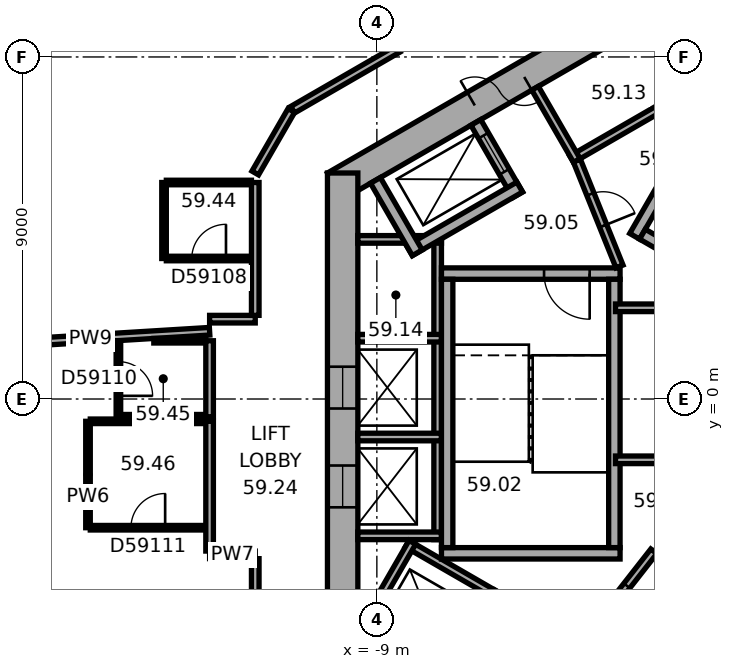
"""IFC4 building model, lengths in metres.
Left out: names, types, materials, properties, quantities, classifications, styles, units other than length and angle.
Written with IfcOpenShell. Run it as: python <this file> out.ifc"""

import sys

from ifc_helpers import new_model, si_unit, direction, frame, frame_2d, origin, place, context, subcontext, project, spatial, rectangle, extrude, element, fill, save


model = new_model("IFC4")
c1 = context("Model", 3, precision=1e-05, world=origin(), true_north=direction((0.0, 1.0)))
c2 = subcontext(c1, "Body", "Model", "MODEL_VIEW")
j1 = project(units=[si_unit("LENGTHUNIT", "METRE"), si_unit("PLANEANGLEUNIT", "RADIAN")], contexts=[c1])
p1 = place(None, origin())
s1 = spatial("IfcSite", under=j1, at=p1, CompositionType="ELEMENT")
p2 = place(p1, origin())
s2 = spatial("IfcBuilding", under=s1, at=p2, CompositionType="ELEMENT")
p3 = place(p2, frame((0.0, 0.0, 240.2)))
s3 = spatial("IfcBuildingStorey", under=s2, at=p3, CompositionType="ELEMENT", Elevation=240.2)
p4 = place(p3, frame((0.2, 11.547, 0.0), z_axis=(0.0, 0.0, 1.0), x_axis=(-0.866023897231, -0.500002609418, 0.0)))
e1 = element("IfcWall", 1, at=p4, inside=s3, PredefinedType="SHEAR", context=c2, shape_type="SweptSolid", body=[
    extrude(rectangle(XDim=11.894, YDim=0.8, at=frame_2d((5.947, 0.0))), origin(), (0.0, 0.0, 1.0), 3.7),
])
p5 = place(p4, frame((6.147, 0.0, 0.0)))
e2 = element("IfcOpeningElement", 2, at=p5, cuts=e1, PredefinedType="OPENING", context=c2, shape_type="SweptSolid", body=[
    extrude(rectangle(XDim=1.5, YDim=2.1, at=frame_2d((0.75, 1.05))), frame((0.0, 0.41, 0.0), z_axis=(0.0, -1.0, 0.0), x_axis=(1.0, 0.0, 0.0)), (0.0, 0.0, 1.0), 0.82),
])
p6 = place(p4, frame((2.997, 0.0, 0.0)))
e3 = element("IfcOpeningElement", 3, at=p6, cuts=e1, PredefinedType="OPENING", context=c2, shape_type="SweptSolid", body=[
    extrude(rectangle(XDim=0.9, YDim=2.1, at=frame_2d((0.45, 1.05))), frame((0.0, 0.41, 0.0), z_axis=(0.0, -1.0, 0.0), x_axis=(1.0, 0.0, 0.0)), (0.0, 0.0, 1.0), 0.82),
])
p7 = place(p3, frame((-9.9, 5.947, 0.0), z_axis=(0.0, 0.0, 1.0), x_axis=(0.0, -1.0, 0.0)))
e4 = element("IfcWall", 4, at=p7, inside=s3, PredefinedType="SHEAR", context=c2, shape_type="SweptSolid", body=[
    extrude(rectangle(XDim=11.894, YDim=0.8, at=frame_2d((5.947, 0.0))), origin(), (0.0, 0.0, 1.0), 3.7),
])
p8 = place(p7, frame((5.097, 0.0, 0.0)))
e5 = element("IfcOpeningElement", 5, at=p8, cuts=e4, PredefinedType="OPENING", context=c2, shape_type="SweptSolid", body=[
    extrude(rectangle(XDim=1.1, YDim=2.1, at=frame_2d((0.55, 1.05))), frame((0.0, 0.41, 0.0), z_axis=(0.0, -1.0, 0.0), x_axis=(1.0, 0.0, 0.0)), (0.0, 0.0, 1.0), 0.82),
])
p9 = place(p7, frame((7.697, 0.0, 0.0)))
e6 = element("IfcOpeningElement", 6, at=p9, cuts=e4, PredefinedType="OPENING", context=c2, shape_type="SweptSolid", body=[
    extrude(rectangle(XDim=1.1, YDim=2.1, at=frame_2d((0.55, 1.05))), frame((0.0, 0.41, 0.0), z_axis=(0.0, -1.0, 0.0), x_axis=(1.0, 0.0, 0.0)), (0.0, 0.0, 1.0), 0.82),
])
p10 = place(p3, frame((0.803, 9.009, 0.0), z_axis=(0.0, 0.0, 1.0), x_axis=(-0.866028230842, -0.499995103361, 0.0)))
e7 = element("IfcWall", 7, at=p10, inside=s3, PredefinedType="PARTITIONING", context=c2, shape_type="SweptSolid", body=[
    extrude(rectangle(XDim=5.4, YDim=0.2, at=frame_2d((2.7, 0.0))), origin(), (0.0, 0.0, 1.0), 3.42),
])
p11 = place(p3, frame((-3.737, 6.272, 0.0), z_axis=(0.0, 0.0, 1.0), x_axis=(-0.50002983664, 0.866008176907, 0.0)))
e8 = element("IfcWall", 8, at=p11, inside=s3, PredefinedType="PARTITIONING", context=c2, shape_type="SweptSolid", body=[
    extrude(rectangle(XDim=2.2, YDim=0.2, at=frame_2d((1.1, 0.0))), origin(), (0.0, 0.0, 1.0), 3.42),
])
p12 = place(p3, frame((-7.4, 4.3, 0.0), z_axis=(0.0, 0.0, 1.0), x_axis=(0.0, -1.0, 0.0)))
e9 = element("IfcWall", 9, at=p12, inside=s3, PredefinedType="PARTITIONING", context=c2, shape_type="SweptSolid", body=[
    extrude(rectangle(XDim=8.0, YDim=0.2, at=frame_2d((4.0, 0.0))), origin(), (0.0, 0.0, 1.0), 3.42),
])
for number, where, z_axis, x_axis in (
    (10, (-7.3, 4.2, 0.0), (0.0, 0.0, 1.0), (-1.0, 0.0, 0.0)),
    (11, (-7.3, 1.6, 0.0), (0.0, 0.0, 1.0), (-1.0, 0.0, 0.0)),
    (12, (-7.3, -1.0, 0.0), (0.0, 0.0, 1.0), (-1.0, 0.0, 0.0)),
    (13, (-7.3, -3.6, 0.0), (0.0, 0.0, 1.0), (-1.0, 0.0, 0.0)),
):
    element("IfcWall", number, at=place(p3, frame(where, z_axis=z_axis, x_axis=x_axis)), inside=s3, PredefinedType="PARTITIONING", context=c2, shape_type="SweptSolid", body=[
        extrude(rectangle(XDim=2.2, YDim=0.2, at=frame_2d((1.1, 0.0))), origin(), (0.0, 0.0, 1.0), 3.42),
    ])
p13 = place(p3, frame((-8.203, -3.809, 0.0), z_axis=(0.0, 0.0, 1.0), x_axis=(0.866028230842, -0.499995103361, 0.0)))
e14 = element("IfcWall", 14, at=p13, inside=s3, PredefinedType="PARTITIONING", context=c2, shape_type="SweptSolid", body=[
    extrude(rectangle(XDim=5.4, YDim=0.2, at=frame_2d((2.7, 0.0))), origin(), (0.0, 0.0, 1.0), 3.42),
])
p14 = place(p3, frame((-8.067, -3.772, 0.0), z_axis=(0.0, 0.0, 1.0), x_axis=(-0.50002983664, -0.866008176907, 0.0)))
e15 = element("IfcWall", 15, at=p14, inside=s3, PredefinedType="PARTITIONING", context=c2, shape_type="SweptSolid", body=[
    extrude(rectangle(XDim=2.2, YDim=0.2, at=frame_2d((1.1, 0.0))), origin(), (0.0, 0.0, 1.0), 3.42),
])
p15 = place(p3, frame((-2.216, 4.282, 0.0), z_axis=(0.0, 0.0, 1.0), x_axis=(0.499977259774, 0.866038532462, 0.0)))
e16 = element("IfcWall", 16, at=p15, inside=s3, PredefinedType="SHEAR", context=c2, shape_type="SweptSolid", body=[
    extrude(rectangle(XDim=4.7, YDim=0.3, at=frame_2d((2.35, 0.0))), origin(), (0.0, 0.0, 1.0), 3.42),
])
p16 = place(p3, frame((4.103, 0.807, 0.0), z_axis=(0.0, 0.0, 1.0), x_axis=(-0.866027801685, 0.499995846692, 0.0)))
e17 = element("IfcWall", 17, at=p16, inside=s3, PredefinedType="SHEAR", context=c2, shape_type="SweptSolid", body=[
    extrude(rectangle(XDim=7.06, YDim=0.3, at=frame_2d((3.53, 0.0))), origin(), (0.0, 0.0, 1.0), 3.42),
])
p17 = place(p3, frame((-2.6, 3.3, 0.0), z_axis=(0.0, 0.0, 1.0), x_axis=(-1.0, 0.0, 0.0)))
e18 = element("IfcWall", 18, at=p17, inside=s3, PredefinedType="SHEAR", context=c2, shape_type="SweptSolid", body=[
    extrude(rectangle(XDim=4.7, YDim=0.3, at=frame_2d((2.35, 0.0))), origin(), (0.0, 0.0, 1.0), 3.42),
])
p18 = place(p17, frame((0.8, 0.0, 0.0)))
e19 = element("IfcOpeningElement", 19, at=p18, cuts=e18, PredefinedType="OPENING", context=c2, shape_type="SweptSolid", body=[
    extrude(rectangle(XDim=1.2, YDim=2.1, at=frame_2d((0.6, 1.05))), frame((0.0, 0.16, 0.0), z_axis=(0.0, -1.0, 0.0), x_axis=(1.0, 0.0, 0.0)), (0.0, 0.0, 1.0), 0.32),
])
p19 = place(p3, frame((-2.6, -4.06, 0.0), z_axis=(0.0, 0.0, 1.0), x_axis=(-1.0, 0.0, 0.0)))
e20 = element("IfcWall", 20, at=p19, inside=s3, PredefinedType="SHEAR", context=c2, shape_type="SweptSolid", body=[
    extrude(rectangle(XDim=4.7, YDim=0.3, at=frame_2d((2.35, 0.0))), origin(), (0.0, 0.0, 1.0), 3.42),
])
for number, where, z_axis, x_axis in (
    (21, (-2.75, 3.15, 0.0), (0.0, 0.0, 1.0), (0.0, -1.0, 0.0)),
    (22, (-7.15, 3.15, 0.0), (0.0, 0.0, 1.0), (0.0, -1.0, 0.0)),
):
    element("IfcWall", number, at=place(p3, frame(where, z_axis=z_axis, x_axis=x_axis)), inside=s3, PredefinedType="SHEAR", context=c2, shape_type="SweptSolid", body=[
        extrude(rectangle(XDim=7.06, YDim=0.3, at=frame_2d((3.53, 0.0))), origin(), (0.0, 0.0, 1.0), 3.42),
    ])
p20 = place(p3, frame((-5.295, 5.372, 0.0), z_axis=(0.0, 0.0, 1.0), x_axis=(-0.500077893725, 0.86598042715, 0.0)))
e23 = element("IfcWall", 23, at=p20, inside=s3, PredefinedType="SHEAR", context=c2, shape_type="SweptSolid", body=[
    extrude(rectangle(XDim=2.2, YDim=0.3, at=frame_2d((1.1, 0.0))), origin(), (0.0, 0.0, 1.0), 3.42),
])
p21 = place(p20, frame((0.7, 0.0, 0.0)))
e24 = element("IfcOpeningElement", 24, at=p21, cuts=e23, PredefinedType="OPENING", context=c2, shape_type="SweptSolid", body=[
    extrude(rectangle(XDim=1.1, YDim=2.1, at=frame_2d((0.55, 1.05))), frame((0.0, 0.16, 0.0), z_axis=(0.0, -1.0, 0.0), x_axis=(1.0, 0.0, 0.0)), (0.0, 0.0, 1.0), 0.32),
])
p22 = place(p3, frame((-5.24, 5.577, 0.0), z_axis=(0.0, 0.0, 1.0), x_axis=(-0.866014461049, -0.500018952895, 0.0)))
e25 = element("IfcWall", 25, at=p22, inside=s3, PredefinedType="SHEAR", context=c2, shape_type="SweptSolid", body=[
    extrude(rectangle(XDim=3.35, YDim=0.3, at=frame_2d((1.675, 0.0))), origin(), (0.0, 0.0, 1.0), 3.42),
])
p23 = place(p3, frame((-7.937, 3.847, 0.0), z_axis=(0.0, 0.0, 1.0), x_axis=(-0.50002983664, 0.866008176907, 0.0)))
e26 = element("IfcWall", 26, at=p23, inside=s3, PredefinedType="SHEAR", context=c2, shape_type="SweptSolid", body=[
    extrude(rectangle(XDim=2.2, YDim=0.3, at=frame_2d((1.1, 0.0))), origin(), (0.0, 0.0, 1.0), 3.42),
])
p24 = place(p3, frame((-2.615, 3.487, 0.0), z_axis=(0.0, 0.0, 1.0), x_axis=(-0.373576831041, 0.92759924068, 0.0)))
e27 = element("IfcWall", 27, at=p24, inside=s3, PredefinedType="PARTITIONING", context=c2, shape_type="SweptSolid", body=[
    extrude(rectangle(XDim=3.002, YDim=0.2, at=frame_2d((1.501, 0.0))), origin(), (0.0, 0.0, 1.0), 3.42),
])
p25 = place(p24, frame((1.15, 0.0, 0.0)))
e28 = element("IfcOpeningElement", 28, at=p25, cuts=e27, PredefinedType="OPENING", context=c2, shape_type="SweptSolid", body=[
    extrude(rectangle(XDim=0.9, YDim=2.1, at=frame_2d((0.45, 1.05))), frame((0.0, 0.11, 0.0), z_axis=(0.0, -1.0, 0.0), x_axis=(1.0, 0.0, 0.0)), (0.0, 0.0, 1.0), 0.22),
])
p26 = place(p3, frame((-1.712, -4.008, 0.0), z_axis=(0.0, 0.0, 1.0), x_axis=(-0.616549420702, -0.787316208287, 0.0)))
e29 = element("IfcWall", 29, at=p26, inside=s3, PredefinedType="PARTITIONING", context=c2, shape_type="SweptSolid", body=[
    extrude(rectangle(XDim=3.002, YDim=0.2, at=frame_2d((1.501, 0.0))), origin(), (0.0, 0.0, 1.0), 3.42),
])
p27 = place(p26, frame((1.15, 0.0, 0.0)))
e30 = element("IfcOpeningElement", 30, at=p27, cuts=e29, PredefinedType="OPENING", context=c2, shape_type="SweptSolid", body=[
    extrude(rectangle(XDim=0.9, YDim=2.1, at=frame_2d((0.45, 1.05))), frame((0.0, 0.11, 0.0), z_axis=(0.0, -1.0, 0.0), x_axis=(1.0, 0.0, 0.0)), (0.0, 0.0, 1.0), 0.22),
])
p28 = place(p3, frame((-2.72, -1.6, 0.0), z_axis=(0.0, 0.0, 1.0), x_axis=(1.0, 0.0, 0.0)))
e31 = element("IfcWall", 31, at=p28, inside=s3, PredefinedType="PARTITIONING", context=c2, shape_type="SweptSolid", body=[
    extrude(rectangle(XDim=5.269, YDim=0.2, at=frame_2d((2.634, 0.0))), origin(), (0.0, 0.0, 1.0), 3.42),
])
p29 = place(p3, frame((-2.72, 2.4, 0.0), z_axis=(0.0, 0.0, 1.0), x_axis=(1.0, 0.0, 0.0)))
e32 = element("IfcWall", 32, at=p29, inside=s3, PredefinedType="PARTITIONING", context=c2, shape_type="SweptSolid", body=[
    extrude(rectangle(XDim=3.883, YDim=0.2, at=frame_2d((1.941, 0.0))), origin(), (0.0, 0.0, 1.0), 3.42),
])
p30 = place(p3, frame((-19.672, 1.4, 0.0), z_axis=(0.0, 0.0, 1.0), x_axis=(0.99813499784, 0.061045278997, 0.0)))
e33 = element("IfcWall", 33, at=p30, inside=s3, PredefinedType="PARTITIONING", context=c2, shape_type="SweptSolid", body=[
    extrude(rectangle(XDim=6.283, YDim=0.2, at=frame_2d((3.142, 0.0))), origin(), (0.0, 0.0, 1.0), 2.87),
])
p31 = place(p3, frame((-16.601, -3.387, 0.0), z_axis=(0.0, 0.0, 1.0), x_axis=(0.0, 1.0, 0.0)))
e34 = element("IfcWall", 34, at=p31, inside=s3, PredefinedType="PARTITIONING", context=c2, shape_type="SweptSolid", body=[
    extrude(rectangle(XDim=2.8, YDim=0.12, at=frame_2d((1.4, 0.0))), origin(), (0.0, 0.0, 1.0), 3.42),
])
p32 = place(p3, frame((-16.541, -0.587, 0.0), z_axis=(0.0, 0.0, 1.0), x_axis=(1.0, 0.0, 0.0)))
e35 = element("IfcWall", 35, at=p32, inside=s3, PredefinedType="PARTITIONING", context=c2, shape_type="SweptSolid", body=[
    extrude(rectangle(XDim=3.04, YDim=0.12, at=frame_2d((1.52, 0.0))), origin(), (0.0, 0.0, 1.0), 3.42),
])
p33 = place(p3, frame((-15.801, -0.467, 0.0), z_axis=(0.0, 0.0, 1.0), x_axis=(0.0, 1.0, 0.0)))
e36 = element("IfcWall", 36, at=p33, inside=s3, PredefinedType="PARTITIONING", context=c2, shape_type="SweptSolid", body=[
    extrude(rectangle(XDim=2.0, YDim=0.12, at=frame_2d((1.0, 0.0))), origin(), (0.0, 0.0, 1.0), 3.42),
])
p34 = place(p33, frame((0.55, 0.0, 0.0)))
e37 = element("IfcOpeningElement", 37, at=p34, cuts=e36, PredefinedType="OPENING", context=c2, shape_type="SweptSolid", body=[
    extrude(rectangle(XDim=0.9, YDim=2.1, at=frame_2d((0.45, 1.05))), frame((0.0, 0.07, 0.0), z_axis=(0.0, -1.0, 0.0), x_axis=(1.0, 0.0, 0.0)), (0.0, 0.0, 1.0), 0.14),
])
p35 = place(p3, frame((-14.869, 1.533, 0.0), z_axis=(0.0, 0.0, 1.0), x_axis=(1.0, 0.0, 0.0)))
e38 = element("IfcWall", 38, at=p35, inside=s3, PredefinedType="PARTITIONING", context=c2, shape_type="SweptSolid", body=[
    extrude(rectangle(XDim=1.368, YDim=0.12, at=frame_2d((0.684, 0.0))), origin(), (0.0, 0.0, 1.0), 3.42),
])
p36 = place(p3, frame((-14.6, 3.697, 0.0), z_axis=(0.0, 0.0, 1.0), x_axis=(0.0, 1.0, 0.0)))
e39 = element("IfcWall", 39, at=p36, inside=s3, PredefinedType="PARTITIONING", context=c2, shape_type="SweptSolid", body=[
    extrude(rectangle(XDim=2.0, YDim=0.12, at=frame_2d((1.0, 0.0))), origin(), (0.0, 0.0, 1.0), 3.42),
])
p37 = place(p3, frame((-14.54, 5.697, 0.0), z_axis=(0.0, 0.0, 1.0), x_axis=(1.0, 0.0, 0.0)))
e40 = element("IfcWall", 40, at=p37, inside=s3, PredefinedType="PARTITIONING", context=c2, shape_type="SweptSolid", body=[
    extrude(rectangle(XDim=2.24, YDim=0.12, at=frame_2d((1.12, 0.0))), origin(), (0.0, 0.0, 1.0), 3.42),
])
p38 = place(p3, frame((-13.501, -3.387, 0.0), z_axis=(0.0, 0.0, 1.0), x_axis=(-1.0, 0.0, 0.0)))
e41 = element("IfcWall", 41, at=p38, inside=s3, PredefinedType="PARTITIONING", context=c2, shape_type="SweptSolid", body=[
    extrude(rectangle(XDim=3.04, YDim=0.12, at=frame_2d((1.52, 0.0))), origin(), (0.0, 0.0, 1.0), 3.42),
])
p39 = place(p38, frame((1.07, 0.0, 0.0)))
e42 = element("IfcOpeningElement", 42, at=p39, cuts=e41, PredefinedType="OPENING", context=c2, shape_type="SweptSolid", body=[
    extrude(rectangle(XDim=0.9, YDim=2.1, at=frame_2d((0.45, 1.05))), frame((0.0, 0.07, 0.0), z_axis=(0.0, -1.0, 0.0), x_axis=(1.0, 0.0, 0.0)), (0.0, 0.0, 1.0), 0.14),
])
p40 = place(p3, frame((-13.501, -0.467, 0.0), z_axis=(0.0, 0.0, 1.0), x_axis=(-1.0, 0.0, 0.0)))
e43 = element("IfcWall", 43, at=p40, inside=s3, PredefinedType="PARTITIONING", context=c2, shape_type="SweptSolid", body=[
    extrude(rectangle(XDim=2.24, YDim=0.12, at=frame_2d((1.12, 0.0))), origin(), (0.0, 0.0, 1.0), 3.42),
])
p41 = place(p3, frame((-13.401, -4.101, 0.0), z_axis=(0.0, 0.0, 1.0), x_axis=(1.0, 0.0, 0.0)))
e44 = element("IfcWall", 44, at=p41, inside=s3, PredefinedType="PARTITIONING", context=c2, shape_type="SweptSolid", body=[
    extrude(rectangle(XDim=1.201, YDim=0.2, at=frame_2d((0.601, 0.0))), origin(), (0.0, 0.0, 1.0), 3.42),
])
p42 = place(p3, frame((-13.401, -0.587, 0.0), z_axis=(0.0, 0.0, 1.0), x_axis=(0.0, -1.0, 0.0)))
e45 = element("IfcWall", 45, at=p42, inside=s3, PredefinedType="PARTITIONING", context=c2, shape_type="SweptSolid", body=[
    extrude(rectangle(XDim=3.414, YDim=0.2, at=frame_2d((1.707, 0.0))), origin(), (0.0, 0.0, 1.0), 3.42),
])
p43 = place(p3, frame((-13.401, 1.533, 0.0), z_axis=(0.0, 0.0, 1.0), x_axis=(0.0, -1.0, 0.0)))
e46 = element("IfcWall", 46, at=p43, inside=s3, PredefinedType="PARTITIONING", context=c2, shape_type="SweptSolid", body=[
    extrude(rectangle(XDim=2.0, YDim=0.2, at=frame_2d((1.0, 0.0))), origin(), (0.0, 0.0, 1.0), 3.42),
])
p44 = place(p3, frame((-12.3, 3.697, 0.0), z_axis=(0.0, 0.0, 1.0), x_axis=(-1.0, 0.0, 0.0)))
e47 = element("IfcWall", 47, at=p44, inside=s3, PredefinedType="PARTITIONING", context=c2, shape_type="SweptSolid", body=[
    extrude(rectangle(XDim=2.24, YDim=0.12, at=frame_2d((1.12, 0.0))), origin(), (0.0, 0.0, 1.0), 3.42),
])
p45 = place(p44, frame((0.67, 0.0, 0.0)))
e48 = element("IfcOpeningElement", 48, at=p45, cuts=e47, PredefinedType="OPENING", context=c2, shape_type="SweptSolid", body=[
    extrude(rectangle(XDim=0.9, YDim=2.1, at=frame_2d((0.45, 1.05))), frame((0.0, 0.07, 0.0), z_axis=(0.0, -1.0, 0.0), x_axis=(1.0, 0.0, 0.0)), (0.0, 0.0, 1.0), 0.14),
])
p46 = place(p3, frame((-12.2, -4.201, 0.0), z_axis=(0.0, 0.0, 1.0), x_axis=(0.0, -1.0, 0.0)))
e49 = element("IfcWall", 49, at=p46, inside=s3, PredefinedType="PARTITIONING", context=c2, shape_type="SweptSolid", body=[
    extrude(rectangle(XDim=1.706, YDim=0.2, at=frame_2d((0.853, 0.0))), origin(), (0.0, 0.0, 1.0), 3.42),
])
p47 = place(p3, frame((-12.2, 2.101, 0.0), z_axis=(0.0, 0.0, 1.0), x_axis=(-1.0, 0.0, 0.0)))
e50 = element("IfcWall", 50, at=p47, inside=s3, PredefinedType="PARTITIONING", context=c2, shape_type="SweptSolid", body=[
    extrude(rectangle(XDim=1.201, YDim=0.2, at=frame_2d((0.601, 0.0))), origin(), (0.0, 0.0, 1.0), 3.42),
])
p48 = place(p3, frame((-12.2, 5.697, 0.0), z_axis=(0.0, 0.0, 1.0), x_axis=(0.0, -1.0, 0.0)))
e51 = element("IfcWall", 51, at=p48, inside=s3, PredefinedType="PARTITIONING", context=c2, shape_type="SweptSolid", body=[
    extrude(rectangle(XDim=3.496, YDim=0.2, at=frame_2d((1.748, 0.0))), origin(), (0.0, 0.0, 1.0), 3.42),
])
p49 = place(p3, frame((-11.25, 7.592, 0.0), z_axis=(0.0, 0.0, 1.0), x_axis=(-0.500022797313, -0.86601224135, 0.0)))
e52 = element("IfcWall", 52, at=p49, inside=s3, PredefinedType="PARTITIONING", context=c2, shape_type="SweptSolid", body=[
    extrude(rectangle(XDim=1.9, YDim=0.2, at=frame_2d((0.95, 0.0))), origin(), (0.0, 0.0, 1.0), 3.42),
])
p50 = place(p3, frame((-8.437, 9.217, 0.0), z_axis=(0.0, 0.0, 1.0), x_axis=(-0.866005660673, -0.500034194513, 0.0)))
e53 = element("IfcWall", 53, at=p50, inside=s3, PredefinedType="PARTITIONING", context=c2, shape_type="SweptSolid", body=[
    extrude(rectangle(XDim=3.209, YDim=0.2, at=frame_2d((1.604, 0.0))), origin(), (0.0, 0.0, 1.0), 3.42),
])
p51 = place(p5, origin())
e54 = element("IfcDoor", 54, at=p51, inside=s3, OperationType="DOUBLE_DOOR_SINGLE_SWING", PredefinedType="DOOR", context=c2, shape_type="SweptSolid", body=[
    extrude(rectangle(XDim=1.5, YDim=2.1, at=frame_2d((0.75, 1.05))), frame((0.0, 0.025, 0.0), z_axis=(0.0, -1.0, 0.0), x_axis=(1.0, 0.0, 0.0)), (0.0, 0.0, 1.0), 0.05),
])
fill(e2, e54)
p52 = place(p18, origin())
e55 = element("IfcDoor", 55, at=p52, inside=s3, OperationType="SINGLE_SWING_RIGHT", PredefinedType="DOOR", context=c2, shape_type="SweptSolid", body=[
    extrude(rectangle(XDim=1.2, YDim=2.1, at=frame_2d((0.6, 1.05))), frame((0.0, 0.025, 0.0), z_axis=(0.0, -1.0, 0.0), x_axis=(1.0, 0.0, 0.0)), (0.0, 0.0, 1.0), 0.05),
])
fill(e19, e55)
p53 = place(p25, origin())
e56 = element("IfcDoor", 56, at=p53, inside=s3, OperationType="SINGLE_SWING_LEFT", PredefinedType="DOOR", context=c2, shape_type="SweptSolid", body=[
    extrude(rectangle(XDim=0.9, YDim=2.1, at=frame_2d((0.45, 1.05))), frame((0.0, 0.025, 0.0), z_axis=(0.0, -1.0, 0.0), x_axis=(1.0, 0.0, 0.0)), (0.0, 0.0, 1.0), 0.05),
])
fill(e28, e56)
p54 = place(p27, origin())
e57 = element("IfcDoor", 57, at=p54, inside=s3, OperationType="SINGLE_SWING_LEFT", PredefinedType="DOOR", context=c2, shape_type="SweptSolid", body=[
    extrude(rectangle(XDim=0.9, YDim=2.1, at=frame_2d((0.45, 1.05))), frame((0.0, 0.025, 0.0), z_axis=(0.0, -1.0, 0.0), x_axis=(1.0, 0.0, 0.0)), (0.0, 0.0, 1.0), 0.05),
])
fill(e30, e57)
p55 = place(p21, origin())
e58 = element("IfcDoor", 58, at=p55, inside=s3, OperationType="DOUBLE_DOOR_SLIDING", PredefinedType="DOOR", context=c2, shape_type="SweptSolid", body=[
    extrude(rectangle(XDim=1.1, YDim=2.1, at=frame_2d((0.55, 1.05))), frame((0.0, 0.025, 0.0), z_axis=(0.0, -1.0, 0.0), x_axis=(1.0, 0.0, 0.0)), (0.0, 0.0, 1.0), 0.05),
])
fill(e24, e58)
p56 = place(p8, origin())
e59 = element("IfcDoor", 59, at=p56, inside=s3, OperationType="DOUBLE_DOOR_SLIDING", PredefinedType="DOOR", context=c2, shape_type="SweptSolid", body=[
    extrude(rectangle(XDim=1.1, YDim=2.1, at=frame_2d((0.55, 1.05))), frame((0.0, 0.025, 0.0), z_axis=(0.0, -1.0, 0.0), x_axis=(1.0, 0.0, 0.0)), (0.0, 0.0, 1.0), 0.05),
])
fill(e5, e59)
p57 = place(p9, origin())
e60 = element("IfcDoor", 60, at=p57, inside=s3, OperationType="DOUBLE_DOOR_SLIDING", PredefinedType="DOOR", context=c2, shape_type="SweptSolid", body=[
    extrude(rectangle(XDim=1.1, YDim=2.1, at=frame_2d((0.55, 1.05))), frame((0.0, 0.025, 0.0), z_axis=(0.0, -1.0, 0.0), x_axis=(1.0, 0.0, 0.0)), (0.0, 0.0, 1.0), 0.05),
])
fill(e6, e60)
p58 = place(p45, origin())
e61 = element("IfcDoor", 61, at=p58, inside=s3, OperationType="SINGLE_SWING_LEFT", PredefinedType="DOOR", context=c2, shape_type="SweptSolid", body=[
    extrude(rectangle(XDim=0.9, YDim=2.1, at=frame_2d((0.45, 1.05))), frame((0.0, 0.025, 0.0), z_axis=(0.0, -1.0, 0.0), x_axis=(1.0, 0.0, 0.0)), (0.0, 0.0, 1.0), 0.05),
])
fill(e48, e61)
p59 = place(p34, origin())
e62 = element("IfcDoor", 62, at=p59, inside=s3, OperationType="SINGLE_SWING_LEFT", PredefinedType="DOOR", context=c2, shape_type="SweptSolid", body=[
    extrude(rectangle(XDim=0.9, YDim=2.1, at=frame_2d((0.45, 1.05))), frame((0.0, 0.025, 0.0), z_axis=(0.0, -1.0, 0.0), x_axis=(1.0, 0.0, 0.0)), (0.0, 0.0, 1.0), 0.05),
])
fill(e37, e62)
p60 = place(p39, origin())
e63 = element("IfcDoor", 63, at=p60, inside=s3, OperationType="SINGLE_SWING_LEFT", PredefinedType="DOOR", context=c2, shape_type="SweptSolid", body=[
    extrude(rectangle(XDim=0.9, YDim=2.1, at=frame_2d((0.45, 1.05))), frame((0.0, 0.025, 0.0), z_axis=(0.0, -1.0, 0.0), x_axis=(1.0, 0.0, 0.0)), (0.0, 0.0, 1.0), 0.05),
])
fill(e42, e63)
save(model, sys.argv[1])
